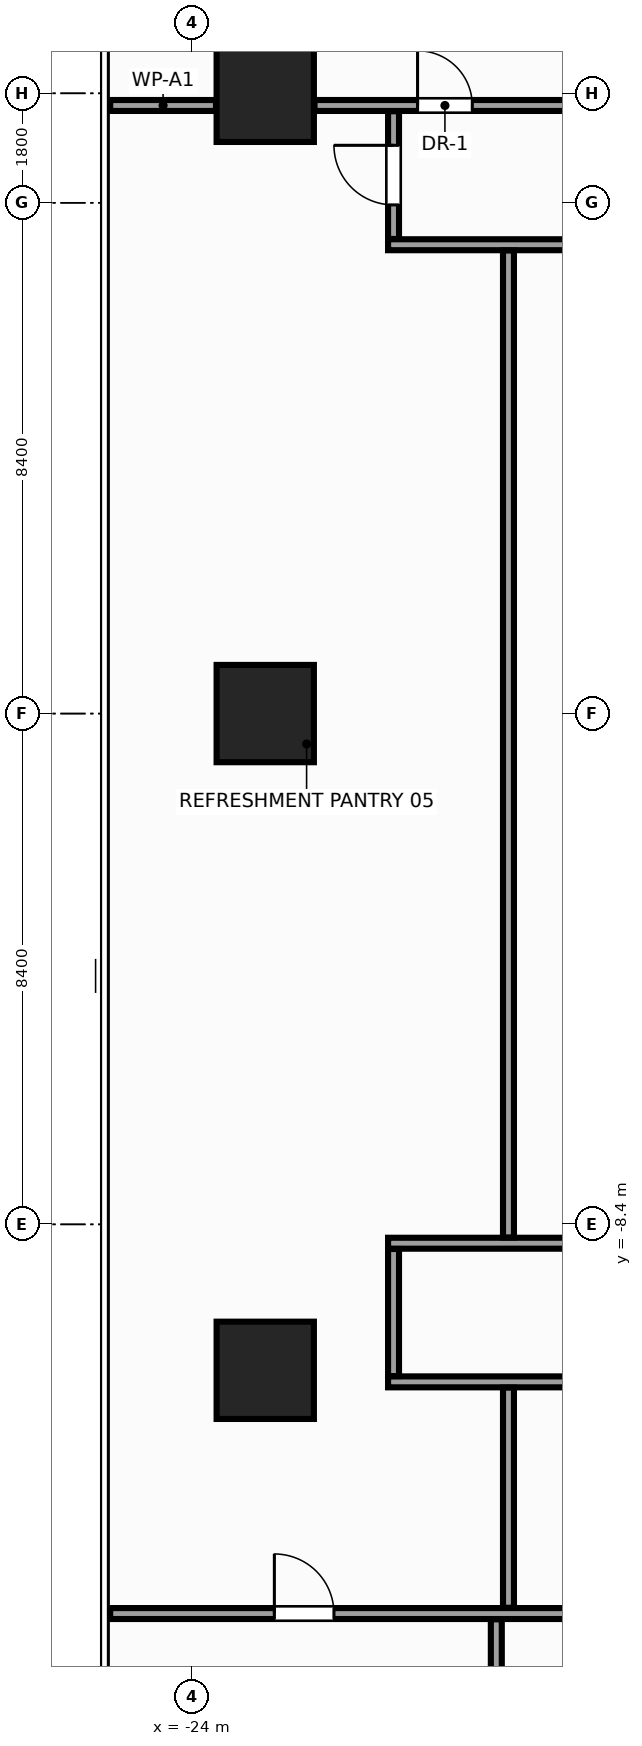
"""IFC4 building model, lengths in metres.
Left out: names, types, materials, properties, quantities, classifications, styles, units other than length and angle.
Written with IfcOpenShell. Run it as: python <this file> out.ifc"""

import sys

from ifc_helpers import new_model, si_unit, direction, frame, frame_2d, origin, origin_2d, place, context, subcontext, project, spatial, rectangle, extrude, source, transform, mapped, element, fill, save


model = new_model("IFC4")
c1 = context("Model", 3, precision=1e-05, world=origin(), true_north=direction((0.0, 1.0)))
c2 = subcontext(c1, "Body", "Model", "MODEL_VIEW")
j1 = project(units=[si_unit("LENGTHUNIT", "METRE"), si_unit("PLANEANGLEUNIT", "RADIAN")], contexts=[c1])
p1 = place(None, origin())
s1 = spatial("IfcSite", under=j1, at=p1, CompositionType="ELEMENT")
p2 = place(p1, origin())
s2 = spatial("IfcBuilding", under=s1, at=p2, CompositionType="ELEMENT")
p3 = place(p2, frame((0.0, 0.0, 113.6)))
s3 = spatial("IfcBuildingStorey", under=s2, at=p3, CompositionType="ELEMENT", Elevation=113.6)
m1 = source(origin(), c2, "Body", "SweptSolid", [
    extrude(rectangle(XDim=1.6, YDim=1.6, at=origin_2d()), origin(), (0.0, 0.0, 1.0), 3.6),
])
for number, where, z_axis, x_axis in (
    (1, (-22.8, -10.8, 0.0), (0.0, 0.0, 1.0), (1.0, 0.0, 0.0)),
    (2, (-22.8, 0.0, 0.0), (0.0, 0.0, 1.0), (1.0, 0.0, 0.0)),
    (3, (-22.8, 10.2, 0.0), (0.0, 0.0, 1.0), (1.0, 0.0, 0.0)),
):
    element("IfcColumn", number, at=place(p3, frame(where, z_axis=z_axis, x_axis=x_axis)), inside=s3, PredefinedType="COLUMN", context=c2, shape_type="MappedRepresentation", body=[
        mapped(m1, transform((0.0, 0.0, 0.0), x_axis=(1.0, 0.0, 0.0), y_axis=(0.0, 1.0, 0.0), z_axis=(0.0, 0.0, 1.0), scale=1.0)),
    ])
m2 = source(origin(), c2, "Body", "SweptSolid", [
    extrude(rectangle(XDim=1.74, YDim=0.18, at=frame_2d((0.87, 0.0))), origin(), (0.0, 0.0, 1.0), 3.36),
])
p4 = place(p3, frame((-25.35, 10.0, 0.0), z_axis=(0.0, 0.0, 1.0), x_axis=(1.0, 0.0, 0.0)))
e4 = element("IfcWall", 4, at=p4, inside=s3, PredefinedType="PARTITIONING", context=c2, shape_type="MappedRepresentation", body=[
    mapped(m2, transform((0.0, 0.0, 0.0), x_axis=(1.0, 0.0, 0.0), y_axis=(0.0, 1.0, 0.0), z_axis=(0.0, 0.0, 1.0), scale=1.0)),
])
m3 = source(origin(), c2, "Body", "SweptSolid", [
    extrude(rectangle(XDim=4.38, YDim=0.18, at=frame_2d((2.19, 0.0))), origin(), (0.0, 0.0, 1.0), 2.745),
])
p5 = place(p3, frame((-21.99, 10.0, 0.0), z_axis=(0.0, 0.0, 1.0), x_axis=(1.0, 0.0, 0.0)))
e5 = element("IfcWall", 5, at=p5, inside=s3, PredefinedType="PARTITIONING", context=c2, shape_type="MappedRepresentation", body=[
    mapped(m3, transform((0.0, 0.0, 0.0), x_axis=(1.0, 0.0, 0.0), y_axis=(0.0, 1.0, 0.0), z_axis=(0.0, 0.0, 1.0), scale=1.0)),
])
p6 = place(p5, frame((1.695, 0.0, 0.0)))
e6 = element("IfcOpeningElement", 6, at=p6, cuts=e5, PredefinedType="OPENING", context=c2, shape_type="SweptSolid", body=[
    extrude(rectangle(XDim=0.9, YDim=2.15, at=frame_2d((0.45, 1.075))), frame((0.0, 0.102, 0.0), z_axis=(0.0, -1.0, 0.0), x_axis=(1.0, 0.0, 0.0)), (0.0, 0.0, 1.0), 0.204),
])
m4 = source(origin(), c2, "Body", "SweptSolid", [
    extrude(rectangle(XDim=16.8, YDim=0.18, at=frame_2d((8.4, 0.0))), origin(), (0.0, 0.0, 1.0), 2.745),
])
p7 = place(p3, frame((-20.78, 7.71, 0.0), z_axis=(0.0, 0.0, 1.0), x_axis=(1.0, 0.0, 0.0)))
e7 = element("IfcWall", 7, at=p7, inside=s3, PredefinedType="PARTITIONING", context=c2, shape_type="MappedRepresentation", body=[
    mapped(m4, transform((0.0, 0.0, 0.0), x_axis=(1.0, 0.0, 0.0), y_axis=(0.0, 1.0, 0.0), z_axis=(0.0, 0.0, 1.0), scale=1.0)),
])
p8 = place(p7, frame((5.69, 0.0, 0.0)))
e8 = element("IfcOpeningElement", 8, at=p8, cuts=e7, PredefinedType="OPENING", context=c2, shape_type="SweptSolid", body=[
    extrude(rectangle(XDim=0.98, YDim=2.15, at=frame_2d((0.49, 1.075))), frame((0.0, 0.102, 0.0), z_axis=(0.0, -1.0, 0.0), x_axis=(1.0, 0.0, 0.0)), (0.0, 0.0, 1.0), 0.204),
])
p9 = place(p7, frame((13.085, 0.0, 0.0)))
e9 = element("IfcOpeningElement", 9, at=p9, cuts=e7, PredefinedType="OPENING", context=c2, shape_type="SweptSolid", body=[
    extrude(rectangle(XDim=0.98, YDim=2.15, at=frame_2d((0.49, 1.075))), frame((0.0, 0.102, 0.0), z_axis=(0.0, -1.0, 0.0), x_axis=(1.0, 0.0, 0.0)), (0.0, 0.0, 1.0), 0.204),
])
p10 = place(p3, frame((-20.78, -8.71, 0.0), z_axis=(0.0, 0.0, 1.0), x_axis=(1.0, 0.0, 0.0)))
e10 = element("IfcWall", 10, at=p10, inside=s3, PredefinedType="PARTITIONING", context=c2, shape_type="MappedRepresentation", body=[
    mapped(m4, transform((0.0, 0.0, 0.0), x_axis=(1.0, 0.0, 0.0), y_axis=(0.0, 1.0, 0.0), z_axis=(0.0, 0.0, 1.0), scale=1.0)),
])
m5 = source(origin(), c2, "Body", "SweptSolid", [
    extrude(rectangle(XDim=3.17, YDim=0.18, at=frame_2d((1.585, 0.0))), origin(), (0.0, 0.0, 1.0), 2.745),
])
p11 = place(p3, frame((-20.78, -10.99, 0.0), z_axis=(0.0, 0.0, 1.0), x_axis=(1.0, 0.0, 0.0)))
e11 = element("IfcWall", 11, at=p11, inside=s3, PredefinedType="PARTITIONING", context=c2, shape_type="MappedRepresentation", body=[
    mapped(m5, transform((0.0, 0.0, 0.0), x_axis=(1.0, 0.0, 0.0), y_axis=(0.0, 1.0, 0.0), z_axis=(0.0, 0.0, 1.0), scale=1.0)),
])
m6 = source(origin(), c2, "Body", "SweptSolid", [
    extrude(rectangle(XDim=2.1, YDim=0.18, at=frame_2d((1.05, 0.0))), origin(), (0.0, 0.0, 1.0), 3.36),
])
p12 = place(p3, frame((-20.69, 7.805, 0.0), z_axis=(0.0, 0.0, 1.0), x_axis=(0.0, 1.0, 0.0)))
e12 = element("IfcWall", 12, at=p12, inside=s3, PredefinedType="PARTITIONING", context=c2, shape_type="MappedRepresentation", body=[
    mapped(m6, transform((0.0, 0.0, 0.0), x_axis=(1.0, 0.0, 0.0), y_axis=(0.0, 1.0, 0.0), z_axis=(0.0, 0.0, 1.0), scale=1.0)),
])
p13 = place(p12, frame((0.56, 0.0, 0.0)))
e13 = element("IfcOpeningElement", 13, at=p13, cuts=e12, PredefinedType="OPENING", context=c2, shape_type="SweptSolid", body=[
    extrude(rectangle(XDim=0.98, YDim=2.15, at=frame_2d((0.49, 1.075))), frame((0.0, 0.102, 0.0), z_axis=(0.0, -1.0, 0.0), x_axis=(1.0, 0.0, 0.0)), (0.0, 0.0, 1.0), 0.204),
])
m7 = source(origin(), c2, "Body", "SweptSolid", [
    extrude(rectangle(XDim=2.09, YDim=0.18, at=frame_2d((1.045, 0.0))), origin(), (0.0, 0.0, 1.0), 3.36),
])
p14 = place(p3, frame((-20.69, -10.895, 0.0), z_axis=(0.0, 0.0, 1.0), x_axis=(0.0, 1.0, 0.0)))
e14 = element("IfcWall", 14, at=p14, inside=s3, PredefinedType="PARTITIONING", context=c2, shape_type="MappedRepresentation", body=[
    mapped(m7, transform((0.0, 0.0, 0.0), x_axis=(1.0, 0.0, 0.0), y_axis=(0.0, 1.0, 0.0), z_axis=(0.0, 0.0, 1.0), scale=1.0)),
])
m8 = source(origin(), c2, "Body", "SweptSolid", [
    extrude(rectangle(XDim=50.7, YDim=0.18, at=frame_2d((25.35, 0.0))), origin(), (0.0, 0.0, 1.0), 2.945),
])
p15 = place(p3, frame((-25.35, -14.8, 0.0), z_axis=(0.0, 0.0, 1.0), x_axis=(1.0, 0.0, 0.0)))
e15 = element("IfcWall", 15, at=p15, inside=s3, PredefinedType="PARTITIONING", context=c2, shape_type="MappedRepresentation", body=[
    mapped(m8, transform((0.0, 0.0, 0.0), x_axis=(1.0, 0.0, 0.0), y_axis=(0.0, 1.0, 0.0), z_axis=(0.0, 0.0, 1.0), scale=1.0)),
])
p16 = place(p15, frame((2.7, 0.0, 0.0)))
e16 = element("IfcOpeningElement", 16, at=p16, cuts=e15, PredefinedType="OPENING", context=c2, shape_type="SweptSolid", body=[
    extrude(rectangle(XDim=0.98, YDim=2.15, at=frame_2d((0.49, 1.075))), frame((0.0, 0.102, 0.0), z_axis=(0.0, -1.0, 0.0), x_axis=(1.0, 0.0, 0.0)), (0.0, 0.0, 1.0), 0.204),
])
p17 = place(p15, frame((46.42, 0.0, 0.0)))
e17 = element("IfcOpeningElement", 17, at=p17, cuts=e15, PredefinedType="OPENING", context=c2, shape_type="SweptSolid", body=[
    extrude(rectangle(XDim=0.98, YDim=2.15, at=frame_2d((0.49, 1.075))), frame((0.0, 0.102, 0.0), z_axis=(0.0, -1.0, 0.0), x_axis=(1.0, 0.0, 0.0)), (0.0, 0.0, 1.0), 0.204),
])
p18 = place(p15, frame((13.16, 0.0, 0.0)))
e18 = element("IfcOpeningElement", 18, at=p18, cuts=e15, PredefinedType="OPENING", context=c2, shape_type="SweptSolid", body=[
    extrude(rectangle(XDim=0.98, YDim=2.15, at=frame_2d((0.49, 1.075))), frame((0.0, 0.102, 0.0), z_axis=(0.0, -1.0, 0.0), x_axis=(1.0, 0.0, 0.0)), (0.0, 0.0, 1.0), 0.204),
])
p19 = place(p15, frame((22.16, 0.0, 0.0)))
e19 = element("IfcOpeningElement", 19, at=p19, cuts=e15, PredefinedType="OPENING", context=c2, shape_type="SweptSolid", body=[
    extrude(rectangle(XDim=0.98, YDim=2.15, at=frame_2d((0.49, 1.075))), frame((0.0, 0.102, 0.0), z_axis=(0.0, -1.0, 0.0), x_axis=(1.0, 0.0, 0.0)), (0.0, 0.0, 1.0), 0.204),
])
p20 = place(p15, frame((30.66, 0.0, 0.0)))
e20 = element("IfcOpeningElement", 20, at=p20, cuts=e15, PredefinedType="OPENING", context=c2, shape_type="SweptSolid", body=[
    extrude(rectangle(XDim=0.98, YDim=2.15, at=frame_2d((0.49, 1.075))), frame((0.0, 0.102, 0.0), z_axis=(0.0, -1.0, 0.0), x_axis=(1.0, 0.0, 0.0)), (0.0, 0.0, 1.0), 0.204),
])
p21 = place(p15, frame((8.96, 0.0, 0.0)))
e21 = element("IfcOpeningElement", 21, at=p21, cuts=e15, PredefinedType="OPENING", context=c2, shape_type="SweptSolid", body=[
    extrude(rectangle(XDim=0.98, YDim=2.15, at=frame_2d((0.49, 1.075))), frame((0.0, 0.102, 0.0), z_axis=(0.0, -1.0, 0.0), x_axis=(1.0, 0.0, 0.0)), (0.0, 0.0, 1.0), 0.204),
])
p22 = place(p15, frame((39.56, 0.0, 0.0)))
e22 = element("IfcOpeningElement", 22, at=p22, cuts=e15, PredefinedType="OPENING", context=c2, shape_type="SweptSolid", body=[
    extrude(rectangle(XDim=0.98, YDim=2.15, at=frame_2d((0.49, 1.075))), frame((0.0, 0.102, 0.0), z_axis=(0.0, -1.0, 0.0), x_axis=(1.0, 0.0, 0.0)), (0.0, 0.0, 1.0), 0.204),
])
m9 = source(origin(), c2, "Body", "SweptSolid", [
    extrude(rectangle(XDim=3.62, YDim=0.18, at=frame_2d((1.81, 0.0))), origin(), (0.0, 0.0, 1.0), 3.36),
])
p23 = place(p3, frame((-18.8, -14.705, 0.0), z_axis=(0.0, 0.0, 1.0), x_axis=(0.0, 1.0, 0.0)))
e23 = element("IfcWall", 23, at=p23, inside=s3, PredefinedType="PARTITIONING", context=c2, shape_type="MappedRepresentation", body=[
    mapped(m9, transform((0.0, 0.0, 0.0), x_axis=(1.0, 0.0, 0.0), y_axis=(0.0, 1.0, 0.0), z_axis=(0.0, 0.0, 1.0), scale=1.0)),
])
m10 = source(origin(), c2, "Body", "SweptSolid", [
    extrude(rectangle(XDim=16.23, YDim=0.18, at=frame_2d((8.115, 0.0))), origin(), (0.0, 0.0, 1.0), 2.745),
])
p24 = place(p3, frame((-18.8, -8.615, 0.0), z_axis=(0.0, 0.0, 1.0), x_axis=(0.0, 1.0, 0.0)))
e24 = element("IfcWall", 24, at=p24, inside=s3, PredefinedType="PARTITIONING", context=c2, shape_type="MappedRepresentation", body=[
    mapped(m10, transform((0.0, 0.0, 0.0), x_axis=(1.0, 0.0, 0.0), y_axis=(0.0, 1.0, 0.0), z_axis=(0.0, 0.0, 1.0), scale=1.0)),
])
m11 = source(origin(), c2, "Body", "SweptSolid", [
    extrude(rectangle(XDim=10.755, YDim=0.18, at=frame_2d((5.377, 0.0))), origin(), (0.0, 0.0, 1.0), 2.745),
])
p25 = place(p3, frame((-19.0, -25.65, 0.0), z_axis=(0.0, 0.0, 1.0), x_axis=(0.0, 1.0, 0.0)))
e25 = element("IfcWall", 25, at=p25, inside=s3, PredefinedType="PARTITIONING", context=c2, shape_type="MappedRepresentation", body=[
    mapped(m11, transform((0.0, 0.0, 0.0), x_axis=(1.0, 0.0, 0.0), y_axis=(0.0, 1.0, 0.0), z_axis=(0.0, 0.0, 1.0), scale=1.0)),
])
m12 = source(origin(), c2, "Body", "SweptSolid", [
    extrude(rectangle(XDim=0.9, YDim=2.15, at=frame_2d((0.45, 1.075))), frame((0.0, 0.025, 0.0), z_axis=(0.0, -1.0, 0.0), x_axis=(1.0, 0.0, 0.0)), (0.0, 0.0, 1.0), 0.05),
])
p26 = place(p6, origin())
e26 = element("IfcDoor", 26, at=p26, inside=s3, OperationType="SINGLE_SWING_LEFT", PredefinedType="DOOR", context=c2, shape_type="MappedRepresentation", body=[
    mapped(m12, transform((0.0, 0.0, 0.0), x_axis=(1.0, 0.0, 0.0), y_axis=(0.0, 1.0, 0.0), z_axis=(0.0, 0.0, 1.0), scale=1.0)),
])
fill(e6, e26)
m13 = source(origin(), c2, "Body", "SweptSolid", [
    extrude(rectangle(XDim=0.98, YDim=2.15, at=frame_2d((0.49, 1.075))), frame((0.0, 0.025, 0.0), z_axis=(0.0, -1.0, 0.0), x_axis=(1.0, 0.0, 0.0)), (0.0, 0.0, 1.0), 0.05),
])
p27 = place(p13, origin())
e27 = element("IfcDoor", 27, at=p27, inside=s3, OperationType="SINGLE_SWING_RIGHT", PredefinedType="DOOR", context=c2, shape_type="MappedRepresentation", body=[
    mapped(m13, transform((0.0, 0.0, 0.0), x_axis=(1.0, 0.0, 0.0), y_axis=(0.0, 1.0, 0.0), z_axis=(0.0, 0.0, 1.0), scale=1.0)),
])
fill(e13, e27)
p28 = place(p16, origin())
e28 = element("IfcDoor", 28, at=p28, inside=s3, OperationType="SINGLE_SWING_LEFT", PredefinedType="DOOR", context=c2, shape_type="MappedRepresentation", body=[
    mapped(m13, transform((0.0, 0.0, 0.0), x_axis=(1.0, 0.0, 0.0), y_axis=(0.0, 1.0, 0.0), z_axis=(0.0, 0.0, 1.0), scale=1.0)),
])
fill(e16, e28)
save(model, sys.argv[1])
